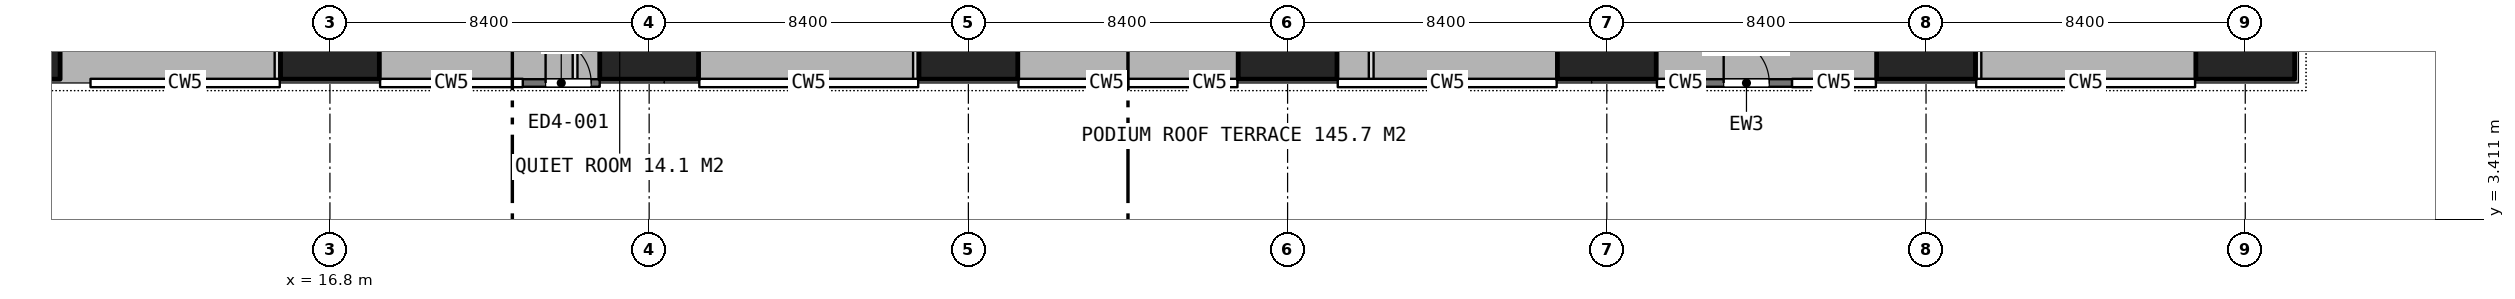
"""IFC4 building model, lengths in metres.
Left out: names, types, materials, properties, quantities, classifications, styles, units other than length and angle.
Written with IfcOpenShell. Run it as: python <this file> out.ifc"""

import sys

from ifc_helpers import new_model, si_unit, direction, frame, frame_2d, origin, origin_2d, place, context, subcontext, project, spatial, rectangle, extrude, element, fill, save


model = new_model("IFC4")
c1 = context("Model", 3, precision=1e-05, world=origin(), true_north=direction((0.0, 1.0)))
c2 = subcontext(c1, "Body", "Model", "MODEL_VIEW")
j1 = project(units=[si_unit("LENGTHUNIT", "METRE"), si_unit("PLANEANGLEUNIT", "RADIAN")], contexts=[c1])
p1 = place(None, origin())
s1 = spatial("IfcSite", under=j1, at=p1, CompositionType="ELEMENT")
p2 = place(p1, origin())
s2 = spatial("IfcBuilding", under=s1, at=p2, CompositionType="ELEMENT")
p3 = place(p2, frame((0.0, 0.0, 25.4)))
s3 = spatial("IfcBuildingStorey", under=s2, at=p3, CompositionType="ELEMENT", Elevation=25.4)
for number, where, z_axis, x_axis in (
    (1, (8.4, 8.4, 0.0), (0.0, 0.0, 1.0), (1.0, 0.0, 0.0)),
    (2, (16.8, 8.4, 0.0), (0.0, 0.0, 1.0), (1.0, 0.0, 0.0)),
    (3, (25.2, 8.4, 0.0), (0.0, 0.0, 1.0), (1.0, 0.0, 0.0)),
    (4, (33.6, 8.4, 0.0), (0.0, 0.0, 1.0), (1.0, 0.0, 0.0)),
    (5, (42.0, 8.4, 0.0), (0.0, 0.0, 1.0), (1.0, 0.0, 0.0)),
    (6, (50.4, 8.4, 0.0), (0.0, 0.0, 1.0), (1.0, 0.0, 0.0)),
    (7, (58.8, 8.4, 0.0), (0.0, 0.0, 1.0), (1.0, 0.0, 0.0)),
    (8, (67.2, 8.4, 0.0), (0.0, 0.0, 1.0), (1.0, 0.0, 0.0)),
):
    element("IfcColumn", number, at=place(p3, frame(where, z_axis=z_axis, x_axis=x_axis)), inside=s3, PredefinedType="COLUMN", context=c2, shape_type="SweptSolid", body=[
        extrude(rectangle(XDim=2.6, YDim=2.6, at=origin_2d()), origin(), (0.0, 0.0, 1.0), 3.75),
    ])
p4 = place(p3, frame((21.875, 7.0, 0.0), z_axis=(0.0, 0.0, 1.0), x_axis=(1.0, 0.0, 0.0)))
e9 = element("IfcWall", 9, at=p4, inside=s3, PredefinedType="SOLIDWALL", context=c2, shape_type="SweptSolid", body=[
    extrude(rectangle(XDim=2.024, YDim=0.2, at=frame_2d((1.012, 0.0))), origin(), (0.0, 0.0, 1.0), 3.5),
])
p5 = place(p4, frame((0.6, 0.0, 0.0)))
e10 = element("IfcOpeningElement", 10, at=p5, cuts=e9, PredefinedType="OPENING", context=c2, shape_type="SweptSolid", body=[
    extrude(rectangle(XDim=1.2, YDim=2.4, at=frame_2d((0.6, 1.2))), frame((0.0, 0.11, 0.0), z_axis=(0.0, -1.0, 0.0), x_axis=(1.0, 0.0, 0.0)), (0.0, 0.0, 1.0), 0.22),
])
p6 = place(p3, frame((52.875, 7.0, 0.0), z_axis=(0.0, 0.0, 1.0), x_axis=(1.0, 0.0, 0.0)))
e11 = element("IfcWall", 11, at=p6, inside=s3, PredefinedType="SOLIDWALL", context=c2, shape_type="SweptSolid", body=[
    extrude(rectangle(XDim=2.4, YDim=0.2, at=frame_2d((1.2, 0.0))), origin(), (0.0, 0.0, 1.0), 3.5),
])
p7 = place(p6, frame((0.6, 0.0, 0.0)))
e12 = element("IfcOpeningElement", 12, at=p7, cuts=e11, PredefinedType="OPENING", context=c2, shape_type="SweptSolid", body=[
    extrude(rectangle(XDim=1.2, YDim=2.4, at=frame_2d((0.6, 1.2))), frame((0.0, 0.11, 0.0), z_axis=(0.0, -1.0, 0.0), x_axis=(1.0, 0.0, 0.0)), (0.0, 0.0, 1.0), 0.22),
])
p8 = place(p3, frame((44.2, 13.0, 0.0), z_axis=(0.0, 0.0, 1.0), x_axis=(0.0, -1.0, 0.0)))
e13 = element("IfcWall", 13, at=p8, inside=s3, PredefinedType="PARTITIONING", context=c2, shape_type="SweptSolid", body=[
    extrude(rectangle(XDim=5.95, YDim=0.125, at=frame_2d((2.975, 0.0))), origin(), (0.0, 0.0, 1.0), 3.5),
])
p9 = place(p3, frame((32.208, 7.08, 0.0), z_axis=(0.0, 0.0, 1.0), x_axis=(0.0, 1.0, 0.0)))
e14 = element("IfcWall", 14, at=p9, inside=s3, PredefinedType="PARTITIONING", context=c2, shape_type="SweptSolid", body=[
    extrude(rectangle(XDim=5.858, YDim=0.125, at=frame_2d((2.929, 0.0))), origin(), (0.0, 0.0, 1.0), 3.5),
])
p10 = place(p3, frame((60.192, 7.08, 0.0), z_axis=(0.0, 0.0, 1.0), x_axis=(0.0, 1.0, 0.0)))
e15 = element("IfcWall", 15, at=p10, inside=s3, PredefinedType="PARTITIONING", context=c2, shape_type="SweptSolid", body=[
    extrude(rectangle(XDim=5.858, YDim=0.125, at=frame_2d((2.929, 0.0))), origin(), (0.0, 0.0, 1.0), 3.5),
])
p11 = place(p10, frame((2.76, 0.0, 0.0)))
e16 = element("IfcOpeningElement", 16, at=p11, cuts=e15, PredefinedType="OPENING", context=c2, shape_type="SweptSolid", body=[
    extrude(rectangle(XDim=1.8, YDim=2.1, at=frame_2d((0.9, 1.05))), frame((0.0, 0.073, 0.0), z_axis=(0.0, -1.0, 0.0), x_axis=(1.0, 0.0, 0.0)), (0.0, 0.0, 1.0), 0.145),
])
p12 = place(p3, frame((23.251, 7.1, 0.0), z_axis=(0.0, 0.0, 1.0), x_axis=(0.0, 1.0, 0.0)))
e17 = element("IfcWall", 17, at=p12, inside=s3, PredefinedType="PARTITIONING", context=c2, shape_type="SweptSolid", body=[
    extrude(rectangle(XDim=5.9, YDim=0.125, at=frame_2d((2.95, 0.0))), origin(), (0.0, 0.0, 1.0), 3.5),
])
p13 = place(p12, frame((2.74, 0.0, 0.0)))
e18 = element("IfcOpeningElement", 18, at=p13, cuts=e17, PredefinedType="OPENING", context=c2, shape_type="SweptSolid", body=[
    extrude(rectangle(XDim=1.0, YDim=2.1, at=frame_2d((0.5, 1.05))), frame((0.0, 0.073, 0.0), z_axis=(0.0, -1.0, 0.0), x_axis=(1.0, 0.0, 0.0)), (0.0, 0.0, 1.0), 0.145),
])
p14 = place(p3, frame((15.408, 12.938, 0.0), z_axis=(0.0, 0.0, 1.0), x_axis=(0.0, -1.0, 0.0)))
e19 = element("IfcWall", 19, at=p14, inside=s3, PredefinedType="PARTITIONING", context=c2, shape_type="SweptSolid", body=[
    extrude(rectangle(XDim=5.858, YDim=0.125, at=frame_2d((2.929, 0.0))), origin(), (0.0, 0.0, 1.0), 3.5),
])
p15 = place(p14, frame((1.297, 0.0, 0.0)))
e20 = element("IfcOpeningElement", 20, at=p15, cuts=e19, PredefinedType="OPENING", context=c2, shape_type="SweptSolid", body=[
    extrude(rectangle(XDim=1.8, YDim=2.1, at=frame_2d((0.9, 1.05))), frame((0.0, 0.073, 0.0), z_axis=(0.0, -1.0, 0.0), x_axis=(1.0, 0.0, 0.0)), (0.0, 0.0, 1.0), 0.145),
])
p16 = place(p5, origin())
e21 = element("IfcDoor", 21, at=p16, inside=s3, OperationType="SINGLE_SWING_LEFT", PredefinedType="DOOR", context=c2, shape_type="SweptSolid", body=[
    extrude(rectangle(XDim=1.2, YDim=2.4, at=frame_2d((0.6, 1.2))), frame((0.0, 0.025, 0.0), z_axis=(0.0, -1.0, 0.0), x_axis=(1.0, 0.0, 0.0)), (0.0, 0.0, 1.0), 0.05),
])
fill(e10, e21)
p17 = place(p7, origin())
e22 = element("IfcDoor", 22, at=p17, inside=s3, OperationType="SINGLE_SWING_LEFT", PredefinedType="DOOR", context=c2, shape_type="SweptSolid", body=[
    extrude(rectangle(XDim=1.2, YDim=2.4, at=frame_2d((0.6, 1.2))), frame((0.0, 0.025, 0.0), z_axis=(0.0, -1.0, 0.0), x_axis=(1.0, 0.0, 0.0)), (0.0, 0.0, 1.0), 0.05),
])
fill(e12, e22)
save(model, sys.argv[1])
